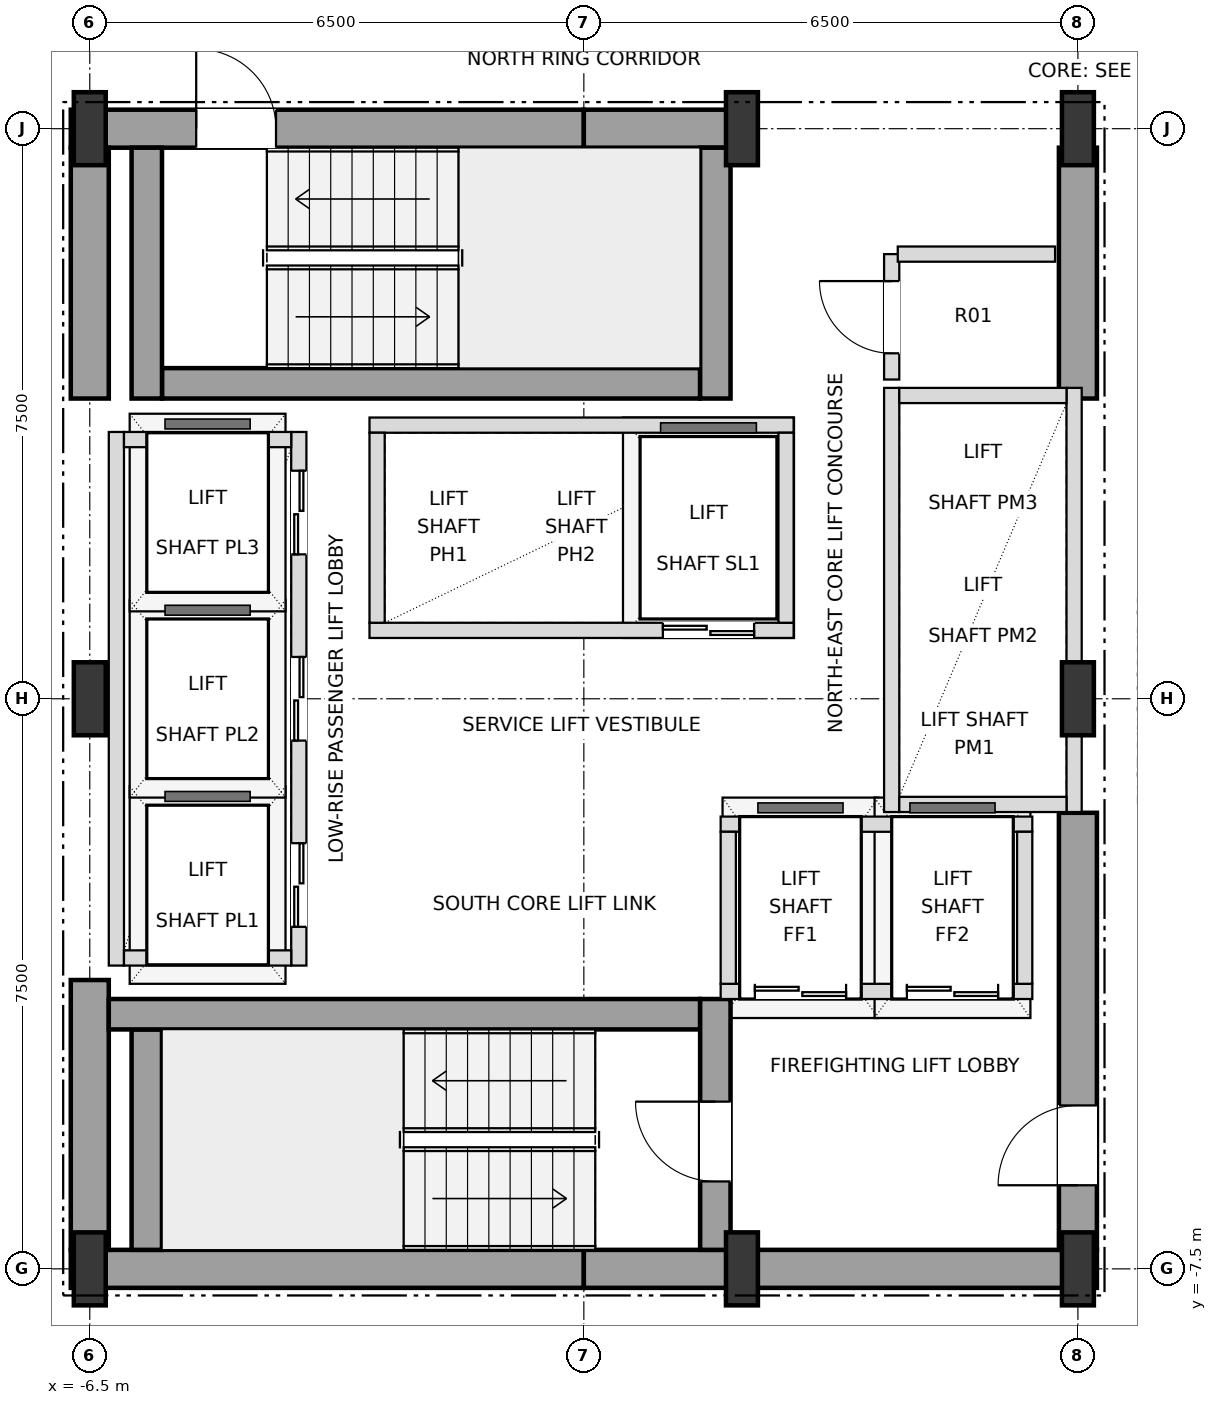
"""IFC4 building model, lengths in metres.
Left out: names, types, materials, properties, quantities, classifications, styles, units other than length and angle.
Written with IfcOpenShell. Run it as: python <this file> out.ifc"""

import sys

from ifc_helpers import new_model, si_unit, direction, frame, frame_2d, origin, origin_2d, place, context, subcontext, project, spatial, rectangle, i_section, extrude, element, fill, save


model = new_model("IFC4")
c1 = context("Model", 3, precision=1e-05, world=origin(), true_north=direction((0.0, 1.0)))
c2 = subcontext(c1, "Body", "Model", "MODEL_VIEW")
j1 = project(units=[si_unit("LENGTHUNIT", "METRE"), si_unit("PLANEANGLEUNIT", "RADIAN")], contexts=[c1])
p1 = place(None, origin())
s1 = spatial("IfcSite", under=j1, at=p1, CompositionType="ELEMENT")
p2 = place(p1, origin())
s2 = spatial("IfcBuilding", under=s1, at=p2, CompositionType="ELEMENT")
p3 = place(p2, frame((0.0, 0.0, 99.0)))
s3 = spatial("IfcBuildingStorey", under=s2, at=p3, CompositionType="ELEMENT", Elevation=99.0)
for number, where, z_axis, x_axis in (
    (1, (-6.5, -7.5, 0.0), (0.0, 0.0, 1.0), (1.0, 0.0, 0.0)),
    (2, (2.08, -7.5, 0.0), (0.0, 0.0, 1.0), (1.0, 0.0, 0.0)),
    (3, (6.5, -7.5, 0.0), (0.0, 0.0, 1.0), (1.0, 0.0, 0.0)),
    (4, (-6.5, 0.0, 0.0), (0.0, 0.0, 1.0), (1.0, 0.0, 0.0)),
    (5, (6.5, 0.0, 0.0), (0.0, 0.0, 1.0), (1.0, 0.0, 0.0)),
    (6, (-6.5, 7.5, 0.0), (0.0, 0.0, 1.0), (1.0, 0.0, 0.0)),
    (7, (2.08, 7.5, 0.0), (0.0, 0.0, 1.0), (1.0, 0.0, 0.0)),
    (8, (6.5, 7.5, 0.0), (0.0, 0.0, 1.0), (1.0, 0.0, 0.0)),
):
    element("IfcColumn", number, at=place(p3, frame(where, z_axis=z_axis, x_axis=x_axis)), inside=s3, PredefinedType="COLUMN", context=c2, shape_type="SweptSolid", body=[
        extrude(i_section(OverallWidth=0.42, OverallDepth=0.96, WebThickness=0.022, FlangeThickness=0.034, at=origin_2d()), origin(), (0.0, 0.0, 1.0), 3.6),
    ])
for number, where, z_axis, x_axis in (
    (9, (-6.75, -7.5, 0.0), (0.0, 0.0, 1.0), (1.0, 0.0, 0.0)),
    (10, (0.0, -7.5, 0.0), (0.0, 0.0, 1.0), (1.0, 0.0, 0.0)),
):
    element("IfcWall", number, at=place(p3, frame(where, z_axis=z_axis, x_axis=x_axis)), inside=s3, PredefinedType="SHEAR", context=c2, shape_type="SweptSolid", body=[
        extrude(rectangle(XDim=6.75, YDim=0.5, at=frame_2d((3.375, 0.0))), origin(), (0.0, 0.0, 1.0), 3.38),
    ])
p4 = place(p3, frame((-6.75, 7.5, 0.0), z_axis=(0.0, 0.0, 1.0), x_axis=(1.0, 0.0, 0.0)))
e11 = element("IfcWall", 11, at=p4, inside=s3, PredefinedType="SHEAR", context=c2, shape_type="SweptSolid", body=[
    extrude(rectangle(XDim=6.75, YDim=0.5, at=frame_2d((3.375, 0.0))), origin(), (0.0, 0.0, 1.0), 3.38),
])
p5 = place(p4, frame((1.65, 0.0, 0.0)))
e12 = element("IfcOpeningElement", 12, at=p5, cuts=e11, PredefinedType="OPENING", context=c2, shape_type="SweptSolid", body=[
    extrude(rectangle(XDim=1.05, YDim=2.15, at=frame_2d((0.525, 1.075))), frame((0.0, 0.26, 0.0), z_axis=(0.0, -1.0, 0.0), x_axis=(1.0, 0.0, 0.0)), (0.0, 0.0, 1.0), 0.52),
])
p6 = place(p3, frame((0.0, 7.5, 0.0), z_axis=(0.0, 0.0, 1.0), x_axis=(1.0, 0.0, 0.0)))
e13 = element("IfcWall", 13, at=p6, inside=s3, PredefinedType="SHEAR", context=c2, shape_type="SweptSolid", body=[
    extrude(rectangle(XDim=2.08, YDim=0.5, at=frame_2d((1.04, 0.0))), origin(), (0.0, 0.0, 1.0), 3.38),
])
p7 = place(p3, frame((-6.5, -7.25, 0.0), z_axis=(0.0, 0.0, 1.0), x_axis=(0.0, 1.0, 0.0)))
e14 = element("IfcWall", 14, at=p7, inside=s3, PredefinedType="SHEAR", context=c2, shape_type="SweptSolid", body=[
    extrude(rectangle(XDim=3.55, YDim=0.5, at=frame_2d((1.775, 0.0))), origin(), (0.0, 0.0, 1.0), 3.38),
])
p8 = place(p3, frame((-6.5, 3.95, 0.0), z_axis=(0.0, 0.0, 1.0), x_axis=(0.0, 1.0, 0.0)))
e15 = element("IfcWall", 15, at=p8, inside=s3, PredefinedType="SHEAR", context=c2, shape_type="SweptSolid", body=[
    extrude(rectangle(XDim=3.3, YDim=0.5, at=frame_2d((1.65, 0.0))), origin(), (0.0, 0.0, 1.0), 3.38),
])
p9 = place(p3, frame((6.5, -7.25, 0.0), z_axis=(0.0, 0.0, 1.0), x_axis=(0.0, 1.0, 0.0)))
e16 = element("IfcWall", 16, at=p9, inside=s3, PredefinedType="SHEAR", context=c2, shape_type="SweptSolid", body=[
    extrude(rectangle(XDim=5.75, YDim=0.5, at=frame_2d((2.875, 0.0))), origin(), (0.0, 0.0, 1.0), 3.38),
])
p10 = place(p9, frame((0.85, 0.0, 0.0)))
e17 = element("IfcOpeningElement", 17, at=p10, cuts=e16, PredefinedType="OPENING", context=c2, shape_type="SweptSolid", body=[
    extrude(rectangle(XDim=1.05, YDim=2.15, at=frame_2d((0.525, 1.075))), frame((0.0, 0.26, 0.0), z_axis=(0.0, -1.0, 0.0), x_axis=(1.0, 0.0, 0.0)), (0.0, 0.0, 1.0), 0.52),
])
p11 = place(p3, frame((6.5, 3.95, 0.0), z_axis=(0.0, 0.0, 1.0), x_axis=(0.0, 1.0, 0.0)))
e18 = element("IfcWall", 18, at=p11, inside=s3, PredefinedType="SHEAR", context=c2, shape_type="SweptSolid", body=[
    extrude(rectangle(XDim=3.3, YDim=0.5, at=frame_2d((1.65, 0.0))), origin(), (0.0, 0.0, 1.0), 3.38),
])
p12 = place(p3, frame((-5.75, -7.25, 0.0), z_axis=(0.0, 0.0, 1.0), x_axis=(0.0, 1.0, 0.0)))
e19 = element("IfcWall", 19, at=p12, inside=s3, PredefinedType="SHEAR", context=c2, shape_type="SweptSolid", body=[
    extrude(rectangle(XDim=2.9, YDim=0.4, at=frame_2d((1.45, 0.0))), origin(), (0.0, 0.0, 1.0), 3.38),
])
p13 = place(p3, frame((-6.25, -4.15, 0.0), z_axis=(0.0, 0.0, 1.0), x_axis=(1.0, 0.0, 0.0)))
e20 = element("IfcWall", 20, at=p13, inside=s3, PredefinedType="SHEAR", context=c2, shape_type="SweptSolid", body=[
    extrude(rectangle(XDim=7.78, YDim=0.4, at=frame_2d((3.89, 0.0))), origin(), (0.0, 0.0, 1.0), 3.38),
])
p14 = place(p3, frame((1.73, -7.25, 0.0), z_axis=(0.0, 0.0, 1.0), x_axis=(0.0, 1.0, 0.0)))
e21 = element("IfcWall", 21, at=p14, inside=s3, PredefinedType="SHEAR", context=c2, shape_type="SweptSolid", body=[
    extrude(rectangle(XDim=3.3, YDim=0.4, at=frame_2d((1.65, 0.0))), origin(), (0.0, 0.0, 1.0), 3.38),
])
p15 = place(p14, frame((0.9, 0.0, 0.0)))
e22 = element("IfcOpeningElement", 22, at=p15, cuts=e21, PredefinedType="OPENING", context=c2, shape_type="SweptSolid", body=[
    extrude(rectangle(XDim=1.05, YDim=2.15, at=frame_2d((0.525, 1.075))), frame((0.0, 0.21, 0.0), z_axis=(0.0, -1.0, 0.0), x_axis=(1.0, 0.0, 0.0)), (0.0, 0.0, 1.0), 0.42),
])
p16 = place(p3, frame((-5.55, 4.15, 0.0), z_axis=(0.0, 0.0, 1.0), x_axis=(1.0, 0.0, 0.0)))
e23 = element("IfcWall", 23, at=p16, inside=s3, PredefinedType="SHEAR", context=c2, shape_type="SweptSolid", body=[
    extrude(rectangle(XDim=7.08, YDim=0.4, at=frame_2d((3.54, 0.0))), origin(), (0.0, 0.0, 1.0), 3.38),
])
for number, where, z_axis, x_axis in (
    (24, (1.73, 3.95, 0.0), (0.0, 0.0, 1.0), (0.0, 1.0, 0.0)),
    (25, (-5.75, 3.95, 0.0), (0.0, 0.0, 1.0), (0.0, 1.0, 0.0)),
):
    element("IfcWall", number, at=place(p3, frame(where, z_axis=z_axis, x_axis=x_axis)), inside=s3, PredefinedType="SHEAR", context=c2, shape_type="SweptSolid", body=[
        extrude(rectangle(XDim=3.3, YDim=0.4, at=frame_2d((1.65, 0.0))), origin(), (0.0, 0.0, 1.0), 3.38),
    ])
p17 = place(p3, frame((-3.75, -3.51, 0.0), z_axis=(0.0, 0.0, 1.0), x_axis=(0.0, 1.0, 0.0)))
e26 = element("IfcWall", 26, at=p17, inside=s3, PredefinedType="SOLIDWALL", context=c2, shape_type="SweptSolid", body=[
    extrude(rectangle(XDim=7.02, YDim=0.2, at=frame_2d((3.51, 0.0))), origin(), (0.0, 0.0, 1.0), 3.38),
])
p18 = place(p17, frame((0.51, 0.0, 0.0)))
e27 = element("IfcOpeningElement", 27, at=p18, cuts=e26, PredefinedType="OPENING", context=c2, shape_type="SweptSolid", body=[
    extrude(rectangle(XDim=1.1, YDim=2.15, at=frame_2d((0.55, 1.075))), frame((0.0, 0.11, 0.0), z_axis=(0.0, -1.0, 0.0), x_axis=(1.0, 0.0, 0.0)), (0.0, 0.0, 1.0), 0.22),
])
p19 = place(p17, frame((2.96, 0.0, 0.0)))
e28 = element("IfcOpeningElement", 28, at=p19, cuts=e26, PredefinedType="OPENING", context=c2, shape_type="SweptSolid", body=[
    extrude(rectangle(XDim=1.1, YDim=2.15, at=frame_2d((0.55, 1.075))), frame((0.0, 0.11, 0.0), z_axis=(0.0, -1.0, 0.0), x_axis=(1.0, 0.0, 0.0)), (0.0, 0.0, 1.0), 0.22),
])
p20 = place(p17, frame((5.41, 0.0, 0.0)))
e29 = element("IfcOpeningElement", 29, at=p20, cuts=e26, PredefinedType="OPENING", context=c2, shape_type="SweptSolid", body=[
    extrude(rectangle(XDim=1.1, YDim=2.15, at=frame_2d((0.55, 1.075))), frame((0.0, 0.11, 0.0), z_axis=(0.0, -1.0, 0.0), x_axis=(1.0, 0.0, 0.0)), (0.0, 0.0, 1.0), 0.22),
])
p21 = place(p3, frame((-6.15, -3.51, 0.0), z_axis=(0.0, 0.0, 1.0), x_axis=(0.0, 1.0, 0.0)))
e30 = element("IfcWall", 30, at=p21, inside=s3, PredefinedType="SOLIDWALL", context=c2, shape_type="SweptSolid", body=[
    extrude(rectangle(XDim=7.02, YDim=0.2, at=frame_2d((3.51, 0.0))), origin(), (0.0, 0.0, 1.0), 3.38),
])
for number, where, z_axis, x_axis in (
    (31, (-6.05, -3.41, 0.0), (0.0, 0.0, 1.0), (1.0, 0.0, 0.0)),
    (32, (-6.05, 3.41, 0.0), (0.0, 0.0, 1.0), (1.0, 0.0, 0.0)),
):
    element("IfcWall", number, at=place(p3, frame(where, z_axis=z_axis, x_axis=x_axis)), inside=s3, PredefinedType="SOLIDWALL", context=c2, shape_type="SweptSolid", body=[
        extrude(rectangle(XDim=2.2, YDim=0.2, at=frame_2d((1.1, 0.0))), origin(), (0.0, 0.0, 1.0), 3.38),
    ])
p22 = place(p3, frame((4.05, -1.49, 0.0), z_axis=(0.0, 0.0, 1.0), x_axis=(0.0, 1.0, 0.0)))
e33 = element("IfcWall", 33, at=p22, inside=s3, PredefinedType="SOLIDWALL", context=c2, shape_type="SweptSolid", body=[
    extrude(rectangle(XDim=5.58, YDim=0.2, at=frame_2d((2.79, 0.0))), origin(), (0.0, 0.0, 1.0), 3.38),
])
p23 = place(p3, frame((6.45, -1.49, 0.0), z_axis=(0.0, 0.0, 1.0), x_axis=(0.0, 1.0, 0.0)))
e34 = element("IfcWall", 34, at=p23, inside=s3, PredefinedType="SOLIDWALL", context=c2, shape_type="SweptSolid", body=[
    extrude(rectangle(XDim=5.58, YDim=0.2, at=frame_2d((2.79, 0.0))), origin(), (0.0, 0.0, 1.0), 2.816),
])
for number, where, z_axis, x_axis in (
    (35, (4.15, -1.39, 0.0), (0.0, 0.0, 1.0), (1.0, 0.0, 0.0)),
    (36, (4.15, 3.99, 0.0), (0.0, 0.0, 1.0), (1.0, 0.0, 0.0)),
):
    element("IfcWall", number, at=place(p3, frame(where, z_axis=z_axis, x_axis=x_axis)), inside=s3, PredefinedType="SOLIDWALL", context=c2, shape_type="SweptSolid", body=[
        extrude(rectangle(XDim=2.2, YDim=0.2, at=frame_2d((1.1, 0.0))), origin(), (0.0, 0.0, 1.0), 3.38),
    ])
p24 = place(p3, frame((-2.82, 0.9, 0.0), z_axis=(0.0, 0.0, 1.0), x_axis=(1.0, 0.0, 0.0)))
e37 = element("IfcWall", 37, at=p24, inside=s3, PredefinedType="SOLIDWALL", context=c2, shape_type="SweptSolid", body=[
    extrude(rectangle(XDim=5.58, YDim=0.2, at=frame_2d((2.79, 0.0))), origin(), (0.0, 0.0, 1.0), 3.38),
])
p25 = place(p24, frame((3.86, 0.0, 0.0)))
e38 = element("IfcOpeningElement", 38, at=p25, cuts=e37, PredefinedType="OPENING", context=c2, shape_type="SweptSolid", body=[
    extrude(rectangle(XDim=1.2, YDim=2.2, at=frame_2d((0.6, 1.1))), frame((0.0, 0.11, 0.0), z_axis=(0.0, -1.0, 0.0), x_axis=(1.0, 0.0, 0.0)), (0.0, 0.0, 1.0), 0.22),
])
p26 = place(p3, frame((-2.82, 3.6, 0.0), z_axis=(0.0, 0.0, 1.0), x_axis=(1.0, 0.0, 0.0)))
e39 = element("IfcWall", 39, at=p26, inside=s3, PredefinedType="SOLIDWALL", context=c2, shape_type="SweptSolid", body=[
    extrude(rectangle(XDim=5.58, YDim=0.2, at=frame_2d((2.79, 0.0))), origin(), (0.0, 0.0, 1.0), 3.38),
])
for number, where, z_axis, x_axis in (
    (40, (-2.72, 1.0, 0.0), (0.0, 0.0, 1.0), (0.0, 1.0, 0.0)),
    (41, (2.66, 1.0, 0.0), (0.0, 0.0, 1.0), (0.0, 1.0, 0.0)),
):
    element("IfcWall", number, at=place(p3, frame(where, z_axis=z_axis, x_axis=x_axis)), inside=s3, PredefinedType="SOLIDWALL", context=c2, shape_type="SweptSolid", body=[
        extrude(rectangle(XDim=2.5, YDim=0.2, at=frame_2d((1.25, 0.0))), origin(), (0.0, 0.0, 1.0), 3.38),
    ])
p27 = place(p3, frame((1.8, -3.85, 0.0), z_axis=(0.0, 0.0, 1.0), x_axis=(1.0, 0.0, 0.0)))
e42 = element("IfcWall", 42, at=p27, inside=s3, PredefinedType="SOLIDWALL", context=c2, shape_type="SweptSolid", body=[
    extrude(rectangle(XDim=4.1, YDim=0.2, at=frame_2d((2.05, 0.0))), origin(), (0.0, 0.0, 1.0), 3.38),
])
p28 = place(p27, frame((0.45, 0.0, 0.0)))
e43 = element("IfcOpeningElement", 43, at=p28, cuts=e42, PredefinedType="OPENING", context=c2, shape_type="SweptSolid", body=[
    extrude(rectangle(XDim=1.2, YDim=2.2, at=frame_2d((0.6, 1.1))), frame((0.0, 0.11, 0.0), z_axis=(0.0, -1.0, 0.0), x_axis=(1.0, 0.0, 0.0)), (0.0, 0.0, 1.0), 0.22),
])
p29 = place(p27, frame((2.45, 0.0, 0.0)))
e44 = element("IfcOpeningElement", 44, at=p29, cuts=e42, PredefinedType="OPENING", context=c2, shape_type="SweptSolid", body=[
    extrude(rectangle(XDim=1.2, YDim=2.2, at=frame_2d((0.6, 1.1))), frame((0.0, 0.11, 0.0), z_axis=(0.0, -1.0, 0.0), x_axis=(1.0, 0.0, 0.0)), (0.0, 0.0, 1.0), 0.22),
])
p30 = place(p3, frame((1.8, -1.65, 0.0), z_axis=(0.0, 0.0, 1.0), x_axis=(1.0, 0.0, 0.0)))
e45 = element("IfcWall", 45, at=p30, inside=s3, PredefinedType="SOLIDWALL", context=c2, shape_type="SweptSolid", body=[
    extrude(rectangle(XDim=4.1, YDim=0.2, at=frame_2d((2.05, 0.0))), origin(), (0.0, 0.0, 1.0), 3.38),
])
for number, where, z_axis, x_axis in (
    (46, (1.9, -3.75, 0.0), (0.0, 0.0, 1.0), (0.0, 1.0, 0.0)),
    (47, (5.8, -3.75, 0.0), (0.0, 0.0, 1.0), (0.0, 1.0, 0.0)),
):
    element("IfcWall", number, at=place(p3, frame(where, z_axis=z_axis, x_axis=x_axis)), inside=s3, PredefinedType="SOLIDWALL", context=c2, shape_type="SweptSolid", body=[
        extrude(rectangle(XDim=2.0, YDim=0.2, at=frame_2d((1.0, 0.0))), origin(), (0.0, 0.0, 1.0), 3.38),
    ])
p31 = place(p3, frame((4.05, 4.2, 0.0), z_axis=(0.0, 0.0, 1.0), x_axis=(0.0, 1.0, 0.0)))
e48 = element("IfcWall", 48, at=p31, inside=s3, PredefinedType="SOLIDWALL", context=c2, shape_type="SweptSolid", body=[
    extrude(rectangle(XDim=1.65, YDim=0.2, at=frame_2d((0.825, 0.0))), origin(), (0.0, 0.0, 1.0), 3.38),
])
p32 = place(p31, frame((0.345, 0.0, 0.0)))
e49 = element("IfcOpeningElement", 49, at=p32, cuts=e48, PredefinedType="OPENING", context=c2, shape_type="SweptSolid", body=[
    extrude(rectangle(XDim=0.95, YDim=2.15, at=frame_2d((0.475, 1.075))), frame((0.0, 0.11, 0.0), z_axis=(0.0, -1.0, 0.0), x_axis=(1.0, 0.0, 0.0)), (0.0, 0.0, 1.0), 0.22),
])
p33 = place(p3, frame((4.13, 5.85, 0.0), z_axis=(0.0, 0.0, 1.0), x_axis=(1.0, 0.0, 0.0)))
e50 = element("IfcWall", 50, at=p33, inside=s3, PredefinedType="SOLIDWALL", context=c2, shape_type="SweptSolid", body=[
    extrude(rectangle(XDim=2.07, YDim=0.2, at=frame_2d((1.035, 0.0))), origin(), (0.0, 0.0, 1.0), 3.38),
])
p34 = place(p10, origin())
e51 = element("IfcDoor", 51, at=p34, inside=s3, OperationType="SINGLE_SWING_LEFT", PredefinedType="DOOR", context=c2, shape_type="SweptSolid", body=[
    extrude(rectangle(XDim=1.05, YDim=2.15, at=frame_2d((0.525, 1.075))), frame((0.0, 0.025, 0.0), z_axis=(0.0, -1.0, 0.0), x_axis=(1.0, 0.0, 0.0)), (0.0, 0.0, 1.0), 0.05),
])
fill(e17, e51)
p35 = place(p15, origin())
e52 = element("IfcDoor", 52, at=p35, inside=s3, OperationType="SINGLE_SWING_RIGHT", PredefinedType="DOOR", context=c2, shape_type="SweptSolid", body=[
    extrude(rectangle(XDim=1.05, YDim=2.15, at=frame_2d((0.525, 1.075))), frame((0.0, 0.025, 0.0), z_axis=(0.0, -1.0, 0.0), x_axis=(1.0, 0.0, 0.0)), (0.0, 0.0, 1.0), 0.05),
])
fill(e22, e52)
p36 = place(p5, origin())
e53 = element("IfcDoor", 53, at=p36, inside=s3, OperationType="SINGLE_SWING_LEFT", PredefinedType="DOOR", context=c2, shape_type="SweptSolid", body=[
    extrude(rectangle(XDim=1.05, YDim=2.15, at=frame_2d((0.525, 1.075))), frame((0.0, 0.025, 0.0), z_axis=(0.0, -1.0, 0.0), x_axis=(1.0, 0.0, 0.0)), (0.0, 0.0, 1.0), 0.05),
])
fill(e12, e53)
p37 = place(p18, origin())
e54 = element("IfcDoor", 54, at=p37, inside=s3, OperationType="DOUBLE_DOOR_SLIDING", PredefinedType="DOOR", context=c2, shape_type="SweptSolid", body=[
    extrude(rectangle(XDim=1.1, YDim=2.15, at=frame_2d((0.55, 1.075))), frame((0.0, 0.025, 0.0), z_axis=(0.0, -1.0, 0.0), x_axis=(1.0, 0.0, 0.0)), (0.0, 0.0, 1.0), 0.05),
])
fill(e27, e54)
p38 = place(p19, origin())
e55 = element("IfcDoor", 55, at=p38, inside=s3, OperationType="DOUBLE_DOOR_SLIDING", PredefinedType="DOOR", context=c2, shape_type="SweptSolid", body=[
    extrude(rectangle(XDim=1.1, YDim=2.15, at=frame_2d((0.55, 1.075))), frame((0.0, 0.025, 0.0), z_axis=(0.0, -1.0, 0.0), x_axis=(1.0, 0.0, 0.0)), (0.0, 0.0, 1.0), 0.05),
])
fill(e28, e55)
p39 = place(p20, origin())
e56 = element("IfcDoor", 56, at=p39, inside=s3, OperationType="DOUBLE_DOOR_SLIDING", PredefinedType="DOOR", context=c2, shape_type="SweptSolid", body=[
    extrude(rectangle(XDim=1.1, YDim=2.15, at=frame_2d((0.55, 1.075))), frame((0.0, 0.025, 0.0), z_axis=(0.0, -1.0, 0.0), x_axis=(1.0, 0.0, 0.0)), (0.0, 0.0, 1.0), 0.05),
])
fill(e29, e56)
p40 = place(p25, origin())
e57 = element("IfcDoor", 57, at=p40, inside=s3, OperationType="DOUBLE_DOOR_SLIDING", PredefinedType="DOOR", context=c2, shape_type="SweptSolid", body=[
    extrude(rectangle(XDim=1.2, YDim=2.2, at=frame_2d((0.6, 1.1))), frame((0.0, 0.025, 0.0), z_axis=(0.0, -1.0, 0.0), x_axis=(1.0, 0.0, 0.0)), (0.0, 0.0, 1.0), 0.05),
])
fill(e38, e57)
p41 = place(p28, origin())
e58 = element("IfcDoor", 58, at=p41, inside=s3, OperationType="DOUBLE_DOOR_SLIDING", PredefinedType="DOOR", context=c2, shape_type="SweptSolid", body=[
    extrude(rectangle(XDim=1.2, YDim=2.2, at=frame_2d((0.6, 1.1))), frame((0.0, 0.025, 0.0), z_axis=(0.0, -1.0, 0.0), x_axis=(1.0, 0.0, 0.0)), (0.0, 0.0, 1.0), 0.05),
])
fill(e43, e58)
p42 = place(p29, origin())
e59 = element("IfcDoor", 59, at=p42, inside=s3, OperationType="DOUBLE_DOOR_SLIDING", PredefinedType="DOOR", context=c2, shape_type="SweptSolid", body=[
    extrude(rectangle(XDim=1.2, YDim=2.2, at=frame_2d((0.6, 1.1))), frame((0.0, 0.025, 0.0), z_axis=(0.0, -1.0, 0.0), x_axis=(1.0, 0.0, 0.0)), (0.0, 0.0, 1.0), 0.05),
])
fill(e44, e59)
p43 = place(p32, origin())
e60 = element("IfcDoor", 60, at=p43, inside=s3, OperationType="SINGLE_SWING_RIGHT", PredefinedType="DOOR", context=c2, shape_type="SweptSolid", body=[
    extrude(rectangle(XDim=0.95, YDim=2.15, at=frame_2d((0.475, 1.075))), frame((0.0, 0.025, 0.0), z_axis=(0.0, -1.0, 0.0), x_axis=(1.0, 0.0, 0.0)), (0.0, 0.0, 1.0), 0.05),
])
fill(e49, e60)
save(model, sys.argv[1])
